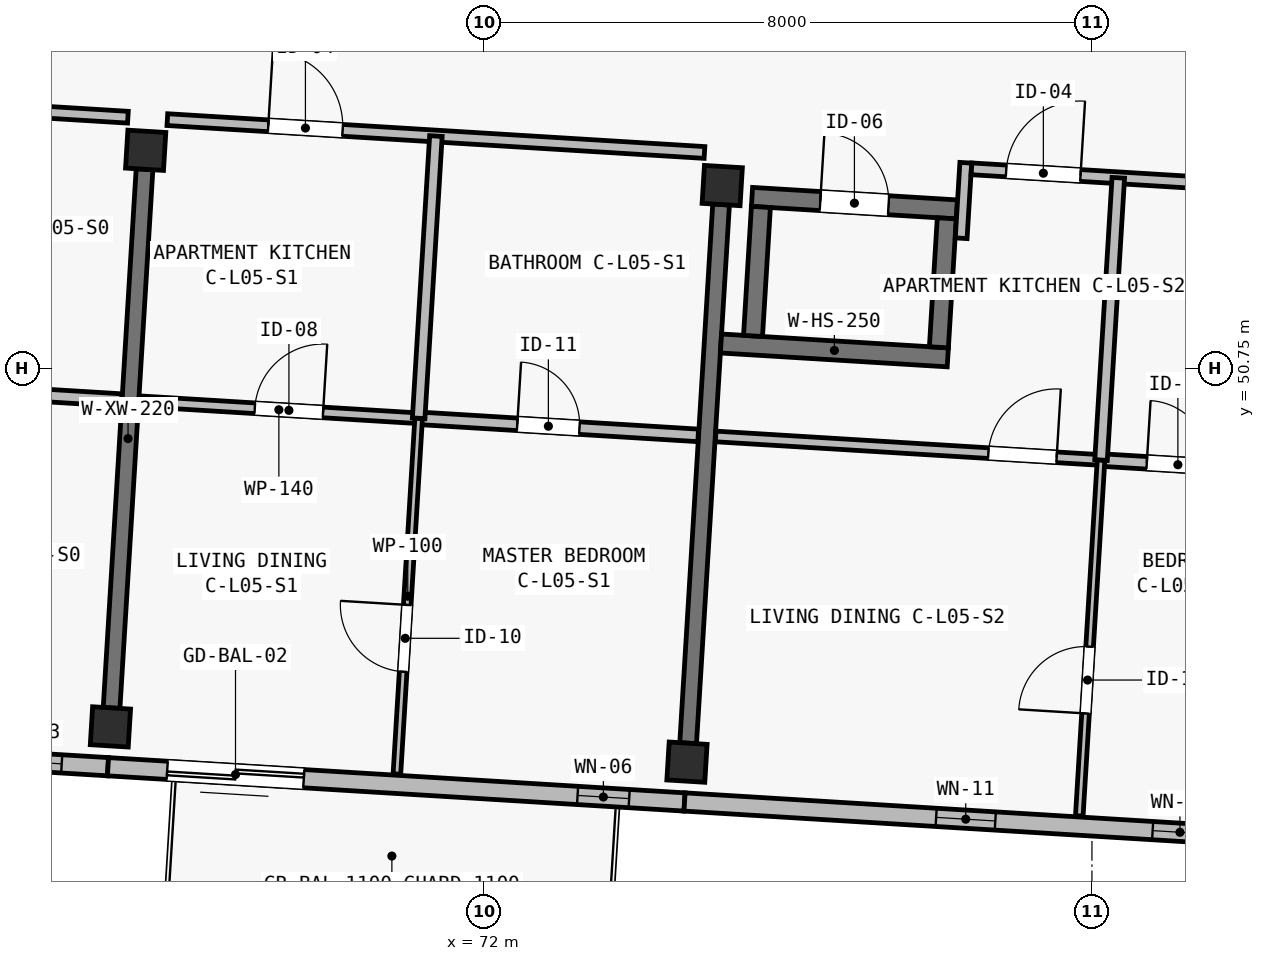
"""IFC4 building model, lengths in metres.
Left out: names, types, materials, properties, quantities, classifications, styles, units other than length and angle.
Written with IfcOpenShell. Run it as: python <this file> out.ifc"""

import sys

from ifc_helpers import new_model, si_unit, direction, frame, frame_2d, origin, origin_2d, place, context, subcontext, project, spatial, rectangle, extrude, element, fill, save


model = new_model("IFC4")
c1 = context("Model", 3, precision=1e-05, world=origin(), true_north=direction((0.0, 1.0)))
c2 = subcontext(c1, "Body", "Model", "MODEL_VIEW")
j1 = project(units=[si_unit("LENGTHUNIT", "METRE"), si_unit("PLANEANGLEUNIT", "RADIAN")], contexts=[c1])
p1 = place(None, origin())
s1 = spatial("IfcSite", under=j1, at=p1, CompositionType="ELEMENT")
p2 = place(p1, origin())
s2 = spatial("IfcBuilding", under=s1, at=p2, CompositionType="ELEMENT")
p3 = place(p2, frame((0.0, 0.0, 18.15)))
s3 = spatial("IfcBuildingStorey", under=s2, at=p3, CompositionType="ELEMENT", Elevation=18.15)
for number, where, z_axis, x_axis in (
    (1, (67.086, 46.036, 0.0), (0.0, 0.0, 1.0), (0.998, -0.061, 0.0)),
    (2, (67.55, 53.622, 0.0), (0.0, 0.0, 1.0), (0.998, -0.061, 0.0)),
    (3, (74.672, 45.572, 0.0), (0.0, 0.0, 1.0), (0.998, -0.061, 0.0)),
    (4, (75.135, 53.158, 0.0), (0.0, 0.0, 1.0), (0.998, -0.061, 0.0)),
):
    element("IfcColumn", number, at=place(p3, frame(where, z_axis=z_axis, x_axis=x_axis)), inside=s3, PredefinedType="COLUMN", context=c2, shape_type="SweptSolid", body=[
        extrude(rectangle(XDim=0.5, YDim=0.5, at=origin_2d()), origin(), (0.0, 0.0, 1.0), 3.25),
    ])
p4 = place(p3, frame((67.101, 46.286, 0.0), z_axis=(0.0, 0.0, 1.0), x_axis=(0.061035953884, 0.998135568114, 0.0)))
e5 = element("IfcWall", 5, at=p4, inside=s3, PredefinedType="SHEAR", context=c2, shape_type="SweptSolid", body=[
    extrude(rectangle(XDim=7.1, YDim=0.22, at=frame_2d((3.55, 0.0))), origin(), (0.0, 0.0, 1.0), 2.5),
])
p5 = place(p3, frame((74.687, 45.822, 0.0), z_axis=(0.0, 0.0, 1.0), x_axis=(0.061033859059, 0.99813569621, 0.0)))
e6 = element("IfcWall", 6, at=p5, inside=s3, PredefinedType="SHEAR", context=c2, shape_type="SweptSolid", body=[
    extrude(rectangle(XDim=7.1, YDim=0.22, at=frame_2d((3.55, 0.0))), origin(), (0.0, 0.0, 1.0), 2.5),
])
p6 = place(p3, frame((75.119, 51.08, 0.0), z_axis=(0.0, 0.0, 1.0), x_axis=(0.998133370443, -0.061071882298, 0.0)))
e7 = element("IfcWall", 7, at=p6, inside=s3, PredefinedType="SHEAR", context=c2, shape_type="SweptSolid", body=[
    extrude(rectangle(XDim=2.99, YDim=0.25, at=frame_2d((1.495, 0.0))), origin(), (0.0, 0.0, 1.0), 3.25),
])
p7 = place(p3, frame((75.527, 53.009, 0.0), z_axis=(0.0, 0.0, 1.0), x_axis=(0.998129907752, -0.061128448781, 0.0)))
e8 = element("IfcWall", 8, at=p7, inside=s3, PredefinedType="SHEAR", context=c2, shape_type="SweptSolid", body=[
    extrude(rectangle(XDim=2.7, YDim=0.25, at=frame_2d((1.35, 0.0))), origin(), (0.0, 0.0, 1.0), 3.25),
])
p8 = place(p7, frame((0.9, 0.0, 0.0)))
e9 = element("IfcOpeningElement", 9, at=p8, cuts=e8, PredefinedType="OPENING", context=c2, shape_type="SweptSolid", body=[
    extrude(rectangle(XDim=0.9, YDim=2.05, at=frame_2d((0.45, 1.025))), frame((0.0, 0.14, 0.0), z_axis=(0.0, -1.0, 0.0), x_axis=(1.0, 0.0, 0.0)), (0.0, 0.0, 1.0), 0.28),
])
p9 = place(p3, frame((75.541, 51.179, 0.0), z_axis=(0.0, 0.0, 1.0), x_axis=(0.061037062968, 0.998135500293, 0.0)))
e10 = element("IfcWall", 10, at=p9, inside=s3, PredefinedType="SHEAR", context=c2, shape_type="SweptSolid", body=[
    extrude(rectangle(XDim=1.7, YDim=0.25, at=frame_2d((0.85, 0.0))), origin(), (0.0, 0.0, 1.0), 3.25),
])
p10 = place(p3, frame((77.986, 51.03, 0.0), z_axis=(0.0, 0.0, 1.0), x_axis=(0.061028314627, 0.998136035225, 0.0)))
e11 = element("IfcWall", 11, at=p10, inside=s3, PredefinedType="SHEAR", context=c2, shape_type="SweptSolid", body=[
    extrude(rectangle(XDim=1.7, YDim=0.25, at=frame_2d((0.85, 0.0))), origin(), (0.0, 0.0, 1.0), 3.25),
])
p11 = place(p3, frame((67.054, 45.512, 0.0), z_axis=(0.0, 0.0, 1.0), x_axis=(-0.998134248939, 0.061057522844, 0.0)))
e12 = element("IfcWall", 12, at=p11, inside=s3, PredefinedType="SOLIDWALL", context=c2, shape_type="SweptSolid", body=[
    extrude(rectangle(XDim=8.125, YDim=0.24, at=frame_2d((4.062, 0.0))), origin(), (0.0, 0.0, 1.0), 3.0),
])
p12 = place(p11, frame((0.61, 0.0, 0.52)))
e13 = element("IfcOpeningElement", 13, at=p12, cuts=e12, PredefinedType="OPENING", context=c2, shape_type="SweptSolid", body=[
    extrude(rectangle(XDim=0.82, YDim=2.18, at=frame_2d((0.41, 1.09))), frame((0.0, 0.135, 0.0), z_axis=(0.0, -1.0, 0.0), x_axis=(1.0, 0.0, 0.0)), (0.0, 0.0, 1.0), 0.27),
])
p13 = place(p11, frame((1.912, 0.0, 0.42)))
e14 = element("IfcOpeningElement", 14, at=p13, cuts=e12, PredefinedType="OPENING", context=c2, shape_type="SweptSolid", body=[
    extrude(rectangle(XDim=0.84, YDim=2.28, at=frame_2d((0.42, 1.14))), frame((0.0, 0.135, 0.0), z_axis=(0.0, -1.0, 0.0), x_axis=(1.0, 0.0, 0.0)), (0.0, 0.0, 1.0), 0.27),
])
p14 = place(p11, frame((5.091, 0.0, 0.52)))
e15 = element("IfcOpeningElement", 15, at=p14, cuts=e12, PredefinedType="OPENING", context=c2, shape_type="SweptSolid", body=[
    extrude(rectangle(XDim=0.58, YDim=2.16, at=frame_2d((0.29, 1.08))), frame((0.0, 0.135, 0.0), z_axis=(0.0, -1.0, 0.0), x_axis=(1.0, 0.0, 0.0)), (0.0, 0.0, 1.0), 0.27),
])
p15 = place(p3, frame((74.64, 45.048, 0.0), z_axis=(0.0, 0.0, 1.0), x_axis=(-0.998135669243, 0.061034300063, 0.0)))
e16 = element("IfcWall", 16, at=p15, inside=s3, PredefinedType="SOLIDWALL", context=c2, shape_type="SweptSolid", body=[
    extrude(rectangle(XDim=7.6, YDim=0.24, at=frame_2d((3.8, 0.0))), origin(), (0.0, 0.0, 1.0), 3.0),
])
p16 = place(p15, frame((5.019, 0.0, 0.0)))
e17 = element("IfcOpeningElement", 17, at=p16, cuts=e16, PredefinedType="OPENING", context=c2, shape_type="SweptSolid", body=[
    extrude(rectangle(XDim=1.8, YDim=2.12, at=frame_2d((0.9, 1.06))), frame((0.0, 0.135, 0.0), z_axis=(0.0, -1.0, 0.0), x_axis=(1.0, 0.0, 0.0)), (0.0, 0.0, 1.0), 0.27),
])
p17 = place(p15, frame((0.73, 0.0, 0.42)))
e18 = element("IfcOpeningElement", 18, at=p17, cuts=e16, PredefinedType="OPENING", context=c2, shape_type="SweptSolid", body=[
    extrude(rectangle(XDim=0.68, YDim=2.24, at=frame_2d((0.34, 1.12))), frame((0.0, 0.135, 0.0), z_axis=(0.0, -1.0, 0.0), x_axis=(1.0, 0.0, 0.0)), (0.0, 0.0, 1.0), 0.27),
])
p18 = place(p3, frame((82.225, 44.584, 0.0), z_axis=(0.0, 0.0, 1.0), x_axis=(-0.998133591969, 0.061068261669, 0.0)))
e19 = element("IfcWall", 19, at=p18, inside=s3, PredefinedType="SOLIDWALL", context=c2, shape_type="SweptSolid", body=[
    extrude(rectangle(XDim=7.6, YDim=0.24, at=frame_2d((3.8, 0.0))), origin(), (0.0, 0.0, 1.0), 3.0),
])
p19 = place(p18, frame((0.71, 0.0, 0.48)))
e20 = element("IfcOpeningElement", 20, at=p19, cuts=e19, PredefinedType="OPENING", context=c2, shape_type="SweptSolid", body=[
    extrude(rectangle(XDim=0.72, YDim=2.16, at=frame_2d((0.36, 1.08))), frame((0.0, 0.135, 0.0), z_axis=(0.0, -1.0, 0.0), x_axis=(1.0, 0.0, 0.0)), (0.0, 0.0, 1.0), 0.27),
])
p20 = place(p18, frame((3.504, 0.0, 0.48)))
e21 = element("IfcOpeningElement", 21, at=p20, cuts=e19, PredefinedType="OPENING", context=c2, shape_type="SweptSolid", body=[
    extrude(rectangle(XDim=0.78, YDim=2.2, at=frame_2d((0.39, 1.1))), frame((0.0, 0.135, 0.0), z_axis=(0.0, -1.0, 0.0), x_axis=(1.0, 0.0, 0.0)), (0.0, 0.0, 1.0), 0.27),
])
p21 = place(p3, frame((60.06, 54.501, 0.0), z_axis=(0.0, 0.0, 1.0), x_axis=(0.998134543433, -0.06105270843, 0.0)))
e22 = element("IfcWall", 22, at=p21, inside=s3, PredefinedType="PARTITIONING", context=c2, shape_type="SweptSolid", body=[
    extrude(rectangle(XDim=7.27, YDim=0.155, at=frame_2d((3.635, 0.0))), origin(), (0.0, 0.0, 1.0), 2.97),
])
p22 = place(p21, frame((1.52, 0.0, 0.0)))
e23 = element("IfcOpeningElement", 23, at=p22, cuts=e22, PredefinedType="OPENING", context=c2, shape_type="SweptSolid", body=[
    extrude(rectangle(XDim=1.02, YDim=2.2, at=frame_2d((0.51, 1.1))), frame((0.0, 0.093, 0.0), z_axis=(0.0, -1.0, 0.0), x_axis=(1.0, 0.0, 0.0)), (0.0, 0.0, 1.0), 0.185),
])
p23 = place(p3, frame((63.555, 50.56, 0.0), z_axis=(0.0, 0.0, 1.0), x_axis=(0.998132682596, -0.061083123148, 0.0)))
e24 = element("IfcWall", 24, at=p23, inside=s3, PredefinedType="PLUMBINGWALL", context=c2, shape_type="SweptSolid", body=[
    extrude(rectangle(XDim=3.685, YDim=0.165, at=frame_2d((1.843, 0.0))), origin(), (0.0, 0.0, 1.0), 2.97),
])
p24 = place(p23, frame((1.3, 0.0, 0.0)))
e25 = element("IfcOpeningElement", 25, at=p24, cuts=e24, PredefinedType="OPENING", context=c2, shape_type="SweptSolid", body=[
    extrude(rectangle(XDim=0.82, YDim=2.08, at=frame_2d((0.41, 1.04))), frame((0.0, 0.097, 0.0), z_axis=(0.0, -1.0, 0.0), x_axis=(1.0, 0.0, 0.0)), (0.0, 0.0, 1.0), 0.195),
])
p25 = place(p3, frame((67.835, 54.025, 0.0), z_axis=(0.0, 0.0, 1.0), x_axis=(0.998135666539, -0.061034344288, 0.0)))
e26 = element("IfcWall", 26, at=p25, inside=s3, PredefinedType="PARTITIONING", context=c2, shape_type="SweptSolid", body=[
    extrude(rectangle(XDim=7.08, YDim=0.155, at=frame_2d((3.54, 0.0))), origin(), (0.0, 0.0, 1.0), 2.97),
])
p26 = place(p25, frame((1.33, 0.0, 0.0)))
e27 = element("IfcOpeningElement", 27, at=p26, cuts=e26, PredefinedType="OPENING", context=c2, shape_type="SweptSolid", body=[
    extrude(rectangle(XDim=0.98, YDim=2.15, at=frame_2d((0.49, 1.075))), frame((0.0, 0.093, 0.0), z_axis=(0.0, -1.0, 0.0), x_axis=(1.0, 0.0, 0.0)), (0.0, 0.0, 1.0), 0.185),
])
p27 = place(p3, frame((67.463, 50.321, 0.0), z_axis=(0.0, 0.0, 1.0), x_axis=(0.998132682596, -0.061083123148, 0.0)))
e28 = element("IfcWall", 28, at=p27, inside=s3, PredefinedType="PARTITIONING", context=c2, shape_type="SweptSolid", body=[
    extrude(rectangle(XDim=3.685, YDim=0.14, at=frame_2d((1.843, 0.0))), origin(), (0.0, 0.0, 1.0), 2.97),
])
p28 = place(p27, frame((1.525, 0.0, 0.0)))
e29 = element("IfcOpeningElement", 29, at=p28, cuts=e28, PredefinedType="OPENING", context=c2, shape_type="SweptSolid", body=[
    extrude(rectangle(XDim=0.9, YDim=2.1, at=frame_2d((0.45, 1.05))), frame((0.0, 0.085, 0.0), z_axis=(0.0, -1.0, 0.0), x_axis=(1.0, 0.0, 0.0)), (0.0, 0.0, 1.0), 0.17),
])
p29 = place(p3, frame((71.141, 50.096, 0.0), z_axis=(0.0, 0.0, 1.0), x_axis=(0.998136472989, -0.061021154439, 0.0)))
e30 = element("IfcWall", 30, at=p29, inside=s3, PredefinedType="PLUMBINGWALL", context=c2, shape_type="SweptSolid", body=[
    extrude(rectangle(XDim=3.685, YDim=0.165, at=frame_2d((1.842, 0.0))), origin(), (0.0, 0.0, 1.0), 2.97),
])
p30 = place(p29, frame((1.3, 0.0, 0.0)))
e31 = element("IfcOpeningElement", 31, at=p30, cuts=e30, PredefinedType="OPENING", context=c2, shape_type="SweptSolid", body=[
    extrude(rectangle(XDim=0.82, YDim=2.08, at=frame_2d((0.41, 1.04))), frame((0.0, 0.097, 0.0), z_axis=(0.0, -1.0, 0.0), x_axis=(1.0, 0.0, 0.0)), (0.0, 0.0, 1.0), 0.195),
])
p31 = place(p3, frame((70.855, 45.415, 0.0), z_axis=(0.0, 0.0, 1.0), x_axis=(0.061062434628, 0.998133948465, 0.0)))
e32 = element("IfcWall", 32, at=p31, inside=s3, PredefinedType="PARTITIONING", context=c2, shape_type="SweptSolid", body=[
    extrude(rectangle(XDim=4.69, YDim=0.1, at=frame_2d((2.345, 0.0))), origin(), (0.0, 0.0, 1.0), 2.97),
])
p32 = place(p31, frame((1.35, 0.0, 0.0)))
e33 = element("IfcOpeningElement", 33, at=p32, cuts=e32, PredefinedType="OPENING", context=c2, shape_type="SweptSolid", body=[
    extrude(rectangle(XDim=0.88, YDim=2.1, at=frame_2d((0.44, 1.05))), frame((0.0, 0.065, 0.0), z_axis=(0.0, -1.0, 0.0), x_axis=(1.0, 0.0, 0.0)), (0.0, 0.0, 1.0), 0.13),
])
p33 = place(p3, frame((71.141, 50.096, 0.0), z_axis=(0.0, 0.0, 1.0), x_axis=(0.061034005467, 0.998135687257, 0.0)))
e34 = element("IfcWall", 34, at=p33, inside=s3, PredefinedType="PLUMBINGWALL", context=c2, shape_type="SweptSolid", body=[
    extrude(rectangle(XDim=3.72, YDim=0.165, at=frame_2d((1.86, 0.0))), origin(), (0.0, 0.0, 1.0), 2.97),
])
p34 = place(p3, frame((78.279, 52.465, 0.0), z_axis=(0.0, 0.0, 1.0), x_axis=(0.061095097219, 0.998131949742, 0.0)))
e35 = element("IfcWall", 35, at=p34, inside=s3, PredefinedType="PARTITIONING", context=c2, shape_type="SweptSolid", body=[
    extrude(rectangle(XDim=0.995, YDim=0.155, at=frame_2d((0.498, 0.0))), origin(), (0.0, 0.0, 1.0), 2.97),
])
p35 = place(p3, frame((78.415, 53.378, 0.0), z_axis=(0.0, 0.0, 1.0), x_axis=(0.998131852862, -0.061096679962, 0.0)))
e36 = element("IfcWall", 36, at=p35, inside=s3, PredefinedType="PARTITIONING", context=c2, shape_type="SweptSolid", body=[
    extrude(rectangle(XDim=4.08, YDim=0.155, at=frame_2d((2.04, 0.0))), origin(), (0.0, 0.0, 1.0), 2.97),
])
p36 = place(p35, frame((0.457, 0.0, 0.0)))
e37 = element("IfcOpeningElement", 37, at=p36, cuts=e36, PredefinedType="OPENING", context=c2, shape_type="SweptSolid", body=[
    extrude(rectangle(XDim=0.98, YDim=2.15, at=frame_2d((0.49, 1.075))), frame((0.0, 0.093, 0.0), z_axis=(0.0, -1.0, 0.0), x_axis=(1.0, 0.0, 0.0)), (0.0, 0.0, 1.0), 0.185),
])
p37 = place(p3, frame((75.049, 49.857, 0.0), z_axis=(0.0, 0.0, 1.0), x_axis=(0.998135637207, -0.061034823981, 0.0)))
e38 = element("IfcWall", 38, at=p37, inside=s3, PredefinedType="PARTITIONING", context=c2, shape_type="SweptSolid", body=[
    extrude(rectangle(XDim=5.08, YDim=0.14, at=frame_2d((2.54, 0.0))), origin(), (0.0, 0.0, 1.0), 2.97),
])
p38 = place(p37, frame((3.595, 0.0, 0.0)))
e39 = element("IfcOpeningElement", 39, at=p38, cuts=e38, PredefinedType="OPENING", context=c2, shape_type="SweptSolid", body=[
    extrude(rectangle(XDim=0.9, YDim=2.1, at=frame_2d((0.45, 1.05))), frame((0.0, 0.085, 0.0), z_axis=(0.0, -1.0, 0.0), x_axis=(1.0, 0.0, 0.0)), (0.0, 0.0, 1.0), 0.17),
])
p39 = place(p3, frame((80.119, 49.547, 0.0), z_axis=(0.0, 0.0, 1.0), x_axis=(0.99813262565, -0.061084053668, 0.0)))
e40 = element("IfcWall", 40, at=p39, inside=s3, PredefinedType="PLUMBINGWALL", context=c2, shape_type="SweptSolid", body=[
    extrude(rectangle(XDim=2.29, YDim=0.165, at=frame_2d((1.145, 0.0))), origin(), (0.0, 0.0, 1.0), 2.97),
])
p40 = place(p39, frame((0.603, 0.0, 0.0)))
e41 = element("IfcOpeningElement", 41, at=p40, cuts=e40, PredefinedType="OPENING", context=c2, shape_type="SweptSolid", body=[
    extrude(rectangle(XDim=0.82, YDim=2.08, at=frame_2d((0.41, 1.04))), frame((0.0, 0.097, 0.0), z_axis=(0.0, -1.0, 0.0), x_axis=(1.0, 0.0, 0.0)), (0.0, 0.0, 1.0), 0.195),
])
p41 = place(p3, frame((79.833, 44.866, 0.0), z_axis=(0.0, 0.0, 1.0), x_axis=(0.061010571843, 0.998137119901, 0.0)))
e42 = element("IfcWall", 42, at=p41, inside=s3, PredefinedType="PARTITIONING", context=c2, shape_type="SweptSolid", body=[
    extrude(rectangle(XDim=4.69, YDim=0.1, at=frame_2d((2.345, 0.0))), origin(), (0.0, 0.0, 1.0), 2.97),
])
p42 = place(p41, frame((1.35, 0.0, 0.0)))
e43 = element("IfcOpeningElement", 43, at=p42, cuts=e42, PredefinedType="OPENING", context=c2, shape_type="SweptSolid", body=[
    extrude(rectangle(XDim=0.88, YDim=2.1, at=frame_2d((0.44, 1.05))), frame((0.0, 0.065, 0.0), z_axis=(0.0, -1.0, 0.0), x_axis=(1.0, 0.0, 0.0)), (0.0, 0.0, 1.0), 0.13),
])
p43 = place(p3, frame((80.119, 49.547, 0.0), z_axis=(0.0, 0.0, 1.0), x_axis=(0.061099388563, 0.998131687062, 0.0)))
e44 = element("IfcWall", 44, at=p43, inside=s3, PredefinedType="PLUMBINGWALL", context=c2, shape_type="SweptSolid", body=[
    extrude(rectangle(XDim=3.72, YDim=0.165, at=frame_2d((1.86, 0.0))), origin(), (0.0, 0.0, 1.0), 2.97),
])
p44 = place(p12, origin())
e45 = element("IfcWindow", 45, at=p44, inside=s3, PartitioningType="SINGLE_PANEL", PredefinedType="WINDOW", context=c2, shape_type="SweptSolid", body=[
    extrude(rectangle(XDim=0.82, YDim=2.18, at=frame_2d((0.41, 1.09))), frame((0.0, 0.03, 0.0), z_axis=(0.0, -1.0, 0.0), x_axis=(1.0, 0.0, 0.0)), (0.0, 0.0, 1.0), 0.06),
])
fill(e13, e45)
p45 = place(p16, origin())
e46 = element("IfcDoor", 46, at=p45, inside=s3, OperationType="SLIDING_TO_LEFT", PredefinedType="DOOR", context=c2, shape_type="SweptSolid", body=[
    extrude(rectangle(XDim=1.8, YDim=2.12, at=frame_2d((0.9, 1.06))), frame((0.0, 0.025, 0.0), z_axis=(0.0, -1.0, 0.0), x_axis=(1.0, 0.0, 0.0)), (0.0, 0.0, 1.0), 0.05),
])
fill(e17, e46)
p46 = place(p17, origin())
e47 = element("IfcWindow", 47, at=p46, inside=s3, PartitioningType="SINGLE_PANEL", PredefinedType="WINDOW", context=c2, shape_type="SweptSolid", body=[
    extrude(rectangle(XDim=0.68, YDim=2.24, at=frame_2d((0.34, 1.12))), frame((0.0, 0.03, 0.0), z_axis=(0.0, -1.0, 0.0), x_axis=(1.0, 0.0, 0.0)), (0.0, 0.0, 1.0), 0.06),
])
fill(e18, e47)
p47 = place(p19, origin())
e48 = element("IfcWindow", 48, at=p47, inside=s3, PartitioningType="SINGLE_PANEL", PredefinedType="WINDOW", context=c2, shape_type="SweptSolid", body=[
    extrude(rectangle(XDim=0.72, YDim=2.16, at=frame_2d((0.36, 1.08))), frame((0.0, 0.03, 0.0), z_axis=(0.0, -1.0, 0.0), x_axis=(1.0, 0.0, 0.0)), (0.0, 0.0, 1.0), 0.06),
])
fill(e20, e48)
p48 = place(p20, origin())
e49 = element("IfcWindow", 49, at=p48, inside=s3, PartitioningType="SINGLE_PANEL", PredefinedType="WINDOW", context=c2, shape_type="SweptSolid", body=[
    extrude(rectangle(XDim=0.78, YDim=2.2, at=frame_2d((0.39, 1.1))), frame((0.0, 0.03, 0.0), z_axis=(0.0, -1.0, 0.0), x_axis=(1.0, 0.0, 0.0)), (0.0, 0.0, 1.0), 0.06),
])
fill(e21, e49)
p49 = place(p26, origin())
e50 = element("IfcDoor", 50, at=p49, inside=s3, OperationType="SINGLE_SWING_LEFT", PredefinedType="DOOR", context=c2, shape_type="SweptSolid", body=[
    extrude(rectangle(XDim=0.98, YDim=2.15, at=frame_2d((0.49, 1.075))), frame((0.0, 0.025, 0.0), z_axis=(0.0, -1.0, 0.0), x_axis=(1.0, 0.0, 0.0)), (0.0, 0.0, 1.0), 0.05),
])
fill(e27, e50)
p50 = place(p28, origin())
e51 = element("IfcDoor", 51, at=p50, inside=s3, OperationType="SINGLE_SWING_RIGHT", PredefinedType="DOOR", context=c2, shape_type="SweptSolid", body=[
    extrude(rectangle(XDim=0.9, YDim=2.1, at=frame_2d((0.45, 1.05))), frame((0.0, 0.025, 0.0), z_axis=(0.0, -1.0, 0.0), x_axis=(1.0, 0.0, 0.0)), (0.0, 0.0, 1.0), 0.05),
])
fill(e29, e51)
p51 = place(p30, origin())
e52 = element("IfcDoor", 52, at=p51, inside=s3, OperationType="SINGLE_SWING_LEFT", PredefinedType="DOOR", context=c2, shape_type="SweptSolid", body=[
    extrude(rectangle(XDim=0.82, YDim=2.08, at=frame_2d((0.41, 1.04))), frame((0.0, 0.025, 0.0), z_axis=(0.0, -1.0, 0.0), x_axis=(1.0, 0.0, 0.0)), (0.0, 0.0, 1.0), 0.05),
])
fill(e31, e52)
p52 = place(p32, origin())
e53 = element("IfcDoor", 53, at=p52, inside=s3, OperationType="SINGLE_SWING_RIGHT", PredefinedType="DOOR", context=c2, shape_type="SweptSolid", body=[
    extrude(rectangle(XDim=0.88, YDim=2.1, at=frame_2d((0.44, 1.05))), frame((0.0, 0.025, 0.0), z_axis=(0.0, -1.0, 0.0), x_axis=(1.0, 0.0, 0.0)), (0.0, 0.0, 1.0), 0.05),
])
fill(e33, e53)
p53 = place(p36, origin())
e54 = element("IfcDoor", 54, at=p53, inside=s3, OperationType="SINGLE_SWING_RIGHT", PredefinedType="DOOR", context=c2, shape_type="SweptSolid", body=[
    extrude(rectangle(XDim=0.98, YDim=2.15, at=frame_2d((0.49, 1.075))), frame((0.0, 0.025, 0.0), z_axis=(0.0, -1.0, 0.0), x_axis=(1.0, 0.0, 0.0)), (0.0, 0.0, 1.0), 0.05),
])
fill(e37, e54)
p54 = place(p38, origin())
e55 = element("IfcDoor", 55, at=p54, inside=s3, OperationType="SINGLE_SWING_RIGHT", PredefinedType="DOOR", context=c2, shape_type="SweptSolid", body=[
    extrude(rectangle(XDim=0.9, YDim=2.1, at=frame_2d((0.45, 1.05))), frame((0.0, 0.025, 0.0), z_axis=(0.0, -1.0, 0.0), x_axis=(1.0, 0.0, 0.0)), (0.0, 0.0, 1.0), 0.05),
])
fill(e39, e55)
p55 = place(p40, origin())
e56 = element("IfcDoor", 56, at=p55, inside=s3, OperationType="SINGLE_SWING_LEFT", PredefinedType="DOOR", context=c2, shape_type="SweptSolid", body=[
    extrude(rectangle(XDim=0.82, YDim=2.08, at=frame_2d((0.41, 1.04))), frame((0.0, 0.025, 0.0), z_axis=(0.0, -1.0, 0.0), x_axis=(1.0, 0.0, 0.0)), (0.0, 0.0, 1.0), 0.05),
])
fill(e41, e56)
p56 = place(p42, origin())
e57 = element("IfcDoor", 57, at=p56, inside=s3, OperationType="SINGLE_SWING_LEFT", PredefinedType="DOOR", context=c2, shape_type="SweptSolid", body=[
    extrude(rectangle(XDim=0.88, YDim=2.1, at=frame_2d((0.44, 1.05))), frame((0.0, 0.025, 0.0), z_axis=(0.0, -1.0, 0.0), x_axis=(1.0, 0.0, 0.0)), (0.0, 0.0, 1.0), 0.05),
])
fill(e43, e57)
p57 = place(p8, origin())
e58 = element("IfcDoor", 58, at=p57, inside=s3, OperationType="SINGLE_SWING_LEFT", PredefinedType="DOOR", context=c2, shape_type="SweptSolid", body=[
    extrude(rectangle(XDim=0.9, YDim=2.05, at=frame_2d((0.45, 1.025))), frame((0.0, 0.025, 0.0), z_axis=(0.0, -1.0, 0.0), x_axis=(1.0, 0.0, 0.0)), (0.0, 0.0, 1.0), 0.05),
])
fill(e9, e58)
save(model, sys.argv[1])
